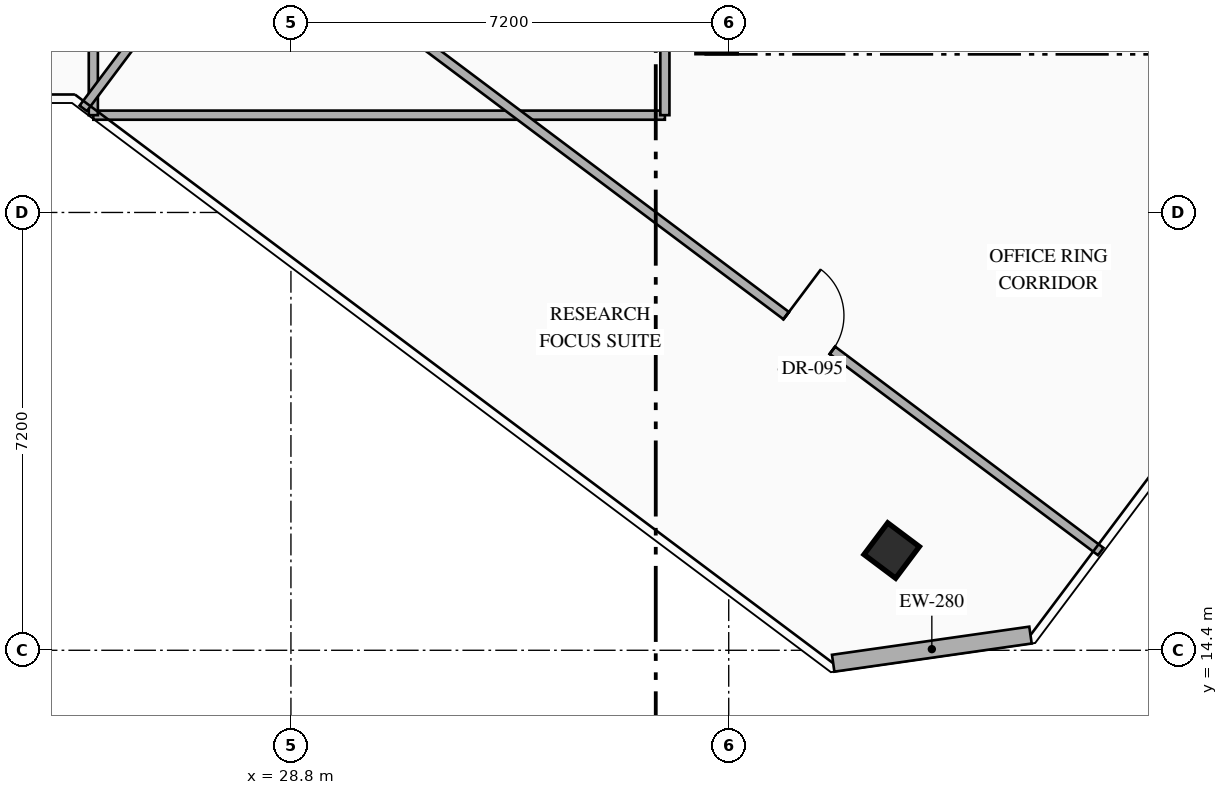
"""IFC4 building model, lengths in metres.
Left out: names, types, materials, properties, quantities, classifications, styles, units other than length and angle.
Written with IfcOpenShell. Run it as: python <this file> out.ifc"""

import sys

from ifc_helpers import new_model, si_unit, direction, frame, frame_2d, origin, origin_2d, place, context, subcontext, project, spatial, rectangle, hollow_rectangle, extrude, element, fill, save


model = new_model("IFC4")
c1 = context("Model", 3, precision=1e-05, world=origin(), true_north=direction((0.0, 1.0)))
c2 = subcontext(c1, "Body", "Model", "MODEL_VIEW")
j1 = project(units=[si_unit("LENGTHUNIT", "METRE"), si_unit("PLANEANGLEUNIT", "RADIAN")], contexts=[c1])
p1 = place(None, origin())
s1 = spatial("IfcSite", under=j1, at=p1, CompositionType="ELEMENT")
p2 = place(p1, origin())
s2 = spatial("IfcBuilding", under=s1, at=p2, CompositionType="ELEMENT")
p3 = place(p2, frame((0.0, 0.0, 250.35)))
s3 = spatial("IfcBuildingStorey", under=s2, at=p3, CompositionType="ELEMENT", Elevation=250.35)
for number, where, z_axis, x_axis in (
    (1, (35.8, 24.55, 0.0), (0.0, 0.0, 1.0), (1.0, 0.0, 0.0)),
    (2, (38.68, 16.04, 0.0), (0.0, 0.0, 1.0), (0.8, -0.6, 0.0)),
):
    element("IfcColumn", number, at=place(p3, frame(where, z_axis=z_axis, x_axis=x_axis)), inside=s3, PredefinedType="COLUMN", context=c2, shape_type="SweptSolid", body=[
        extrude(hollow_rectangle(XDim=0.65, YDim=0.65, WallThickness=0.025, at=origin_2d()), origin(), (0.0, 0.0, 1.0), 3.6),
    ])
p4 = place(p3, frame((40.963, 14.65, 0.0), z_axis=(0.0, 0.0, 1.0), x_axis=(-0.989977778067, -0.141223223777, 0.0)))
e3 = element("IfcWall", 3, at=p4, inside=s3, PredefinedType="STANDARD", context=c2, shape_type="SweptSolid", body=[
    extrude(rectangle(XDim=3.278, YDim=0.28, at=frame_2d((1.639, 0.0))), origin(), (0.0, 0.0, 1.0), 3.35),
])
p5 = place(p3, frame((25.55, 23.2, 0.0), z_axis=(0.0, 0.0, 1.0), x_axis=(1.0, 0.0, 0.0)))
e4 = element("IfcWall", 4, at=p5, inside=s3, PredefinedType="PARTITIONING", context=c2, shape_type="SweptSolid", body=[
    extrude(rectangle(XDim=9.4, YDim=0.15, at=frame_2d((4.7, 0.0))), origin(), (0.0, 0.0, 1.0), 3.35),
])
p6 = place(p3, frame((25.55, 23.2, 0.0), z_axis=(0.0, 0.0, 1.0), x_axis=(0.0, 1.0, 0.0)))
e5 = element("IfcWall", 5, at=p6, inside=s3, PredefinedType="PARTITIONING", context=c2, shape_type="SweptSolid", body=[
    extrude(rectangle(XDim=7.15, YDim=0.15, at=frame_2d((3.575, 0.0))), origin(), (0.0, 0.0, 1.0), 2.757),
])
p7 = place(p3, frame((34.95, 23.2, 0.0), z_axis=(0.0, 0.0, 1.0), x_axis=(0.0, 1.0, 0.0)))
e6 = element("IfcWall", 6, at=p7, inside=s3, PredefinedType="PARTITIONING", context=c2, shape_type="SweptSolid", body=[
    extrude(rectangle(XDim=7.15, YDim=0.15, at=frame_2d((3.575, 0.0))), origin(), (0.0, 0.0, 1.0), 3.35),
])
p8 = place(p3, frame((27.91, 26.68, 0.0), z_axis=(0.0, 0.0, 1.0), x_axis=(0.8, -0.6, 0.0)))
e7 = element("IfcWall", 7, at=p8, inside=s3, PredefinedType="PARTITIONING", context=c2, shape_type="SweptSolid", body=[
    extrude(rectangle(XDim=17.76, YDim=0.15, at=frame_2d((8.88, 0.0))), origin(), (0.0, 0.0, 1.0), 3.35),
])
p9 = place(p8, frame((11.294, 0.0, 0.0)))
e8 = element("IfcOpeningElement", 8, at=p9, cuts=e7, PredefinedType="OPENING", context=c2, shape_type="SweptSolid", body=[
    extrude(rectangle(XDim=0.95, YDim=2.15, at=frame_2d((0.475, 1.075))), frame((0.0, 0.085, 0.0), z_axis=(0.0, -1.0, 0.0), x_axis=(1.0, 0.0, 0.0)), (0.0, 0.0, 1.0), 0.17),
])
p10 = place(p3, frame((25.384, 23.312, 0.0), z_axis=(0.0, 0.0, 1.0), x_axis=(0.599990721155, 0.80000695905, 0.0)))
e9 = element("IfcWall", 9, at=p10, inside=s3, PredefinedType="PARTITIONING", context=c2, shape_type="SweptSolid", body=[
    extrude(rectangle(XDim=4.21, YDim=0.15, at=frame_2d((2.105, 0.0))), origin(), (0.0, 0.0, 1.0), 3.35),
])
p11 = place(p9, origin())
e10 = element("IfcDoor", 10, at=p11, inside=s3, OperationType="SINGLE_SWING_LEFT", PredefinedType="DOOR", context=c2, shape_type="SweptSolid", body=[
    extrude(rectangle(XDim=0.95, YDim=2.15, at=frame_2d((0.475, 1.075))), frame((0.0, 0.025, 0.0), z_axis=(0.0, -1.0, 0.0), x_axis=(1.0, 0.0, 0.0)), (0.0, 0.0, 1.0), 0.05),
])
fill(e8, e10)
save(model, sys.argv[1])
